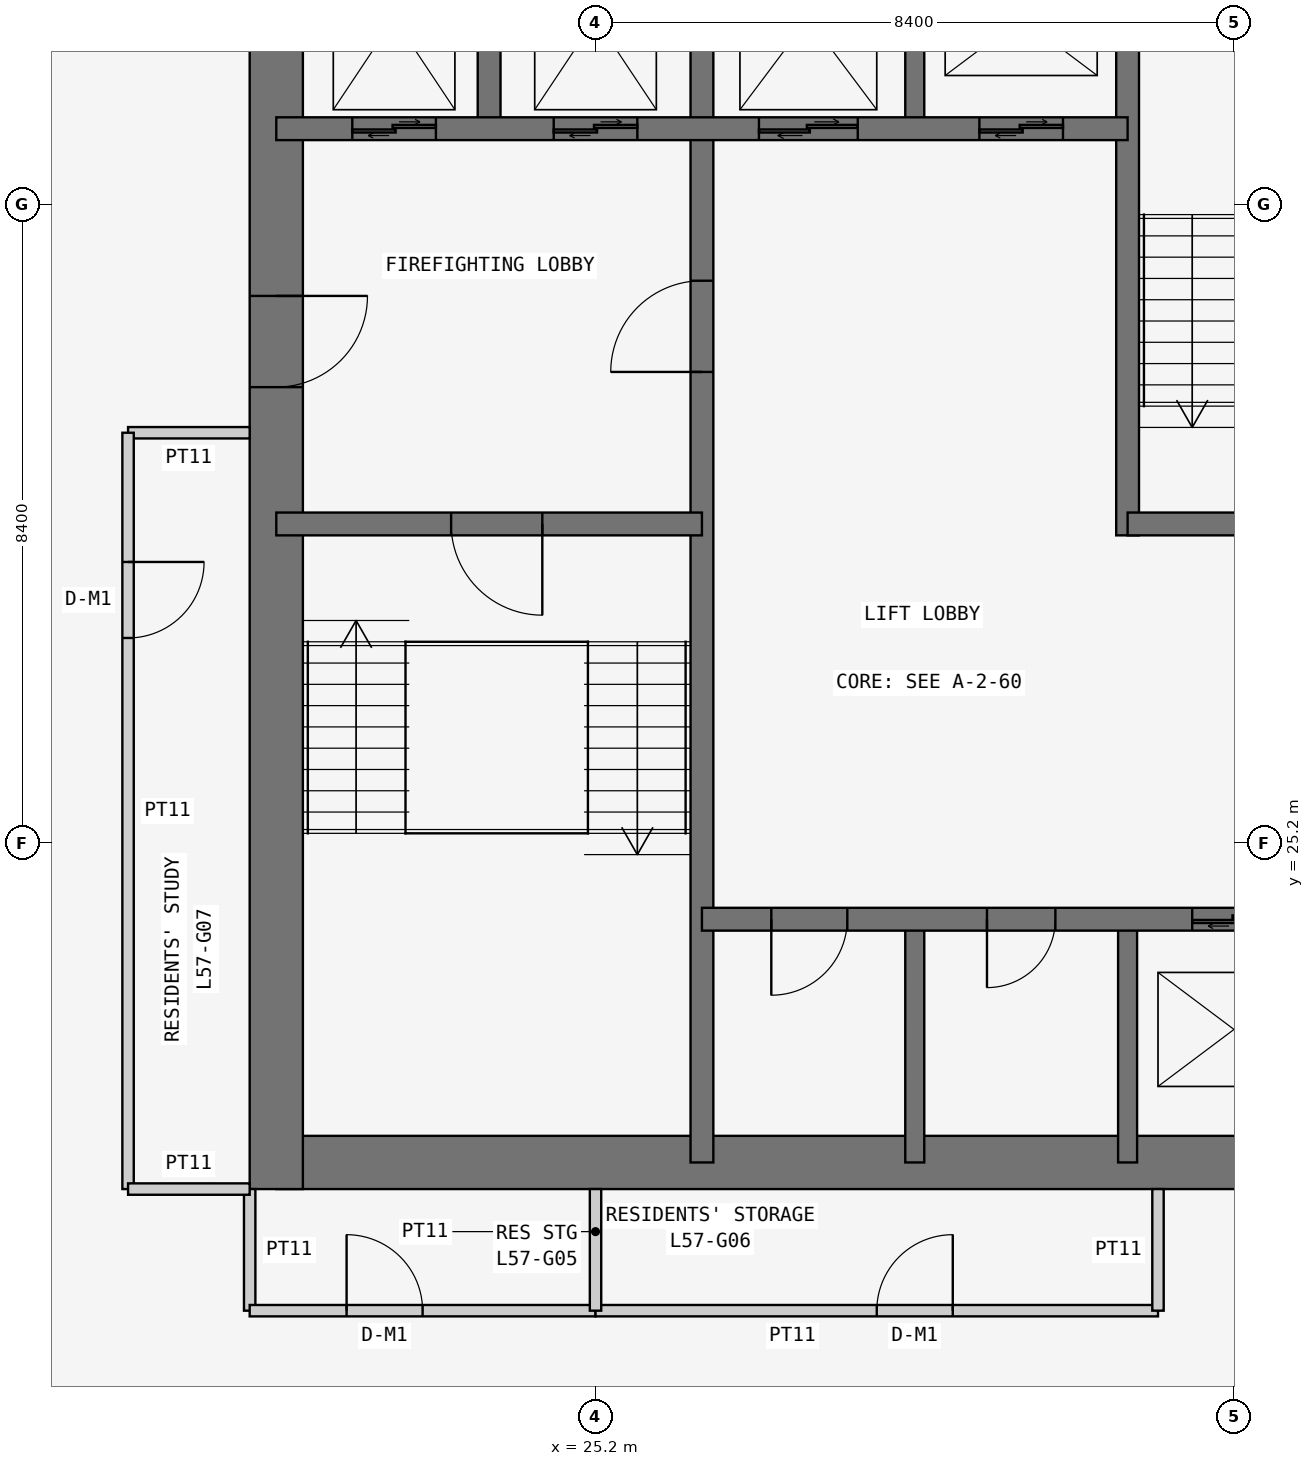
"""IFC4 building model, lengths in metres.
Left out: names, types, materials, properties, quantities, classifications, styles, units other than length and angle.
Written with IfcOpenShell. Run it as: python <this file> out.ifc"""

import sys

from ifc_helpers import new_model, si_unit, direction, frame, frame_2d, origin, place, context, subcontext, project, spatial, rectangle, extrude, element, fill, save


model = new_model("IFC4")
c1 = context("Model", 3, precision=1e-05, world=origin(), true_north=direction((0.0, 1.0)))
c2 = subcontext(c1, "Body", "Model", "MODEL_VIEW")
j1 = project(units=[si_unit("LENGTHUNIT", "METRE"), si_unit("PLANEANGLEUNIT", "RADIAN")], contexts=[c1])
p1 = place(None, origin())
s1 = spatial("IfcSite", under=j1, at=p1, CompositionType="ELEMENT")
p2 = place(p1, origin())
s2 = spatial("IfcBuilding", under=s1, at=p2, CompositionType="ELEMENT")
p3 = place(p2, frame((0.0, 0.0, 219.3)))
s3 = spatial("IfcBuildingStorey", under=s2, at=p3, CompositionType="ELEMENT", Elevation=219.3)
p4 = place(p3, frame((21.0, 21.0, 0.0), z_axis=(0.0, 0.0, 1.0), x_axis=(1.0, 0.0, 0.0)))
e1 = element("IfcWall", 1, at=p4, inside=s3, PredefinedType="SHEAR", context=c2, shape_type="SweptSolid", body=[
    extrude(rectangle(XDim=17.15, YDim=0.7, at=frame_2d((8.575, 0.0))), origin(), (0.0, 0.0, 1.0), 3.6),
])
p5 = place(p3, frame((21.0, 37.8, 0.0), z_axis=(0.0, 0.0, 1.0), x_axis=(0.0, -1.0, 0.0)))
e2 = element("IfcWall", 2, at=p5, inside=s3, PredefinedType="SHEAR", context=c2, shape_type="SweptSolid", body=[
    extrude(rectangle(XDim=17.15, YDim=0.7, at=frame_2d((8.575, 0.0))), origin(), (0.0, 0.0, 1.0), 3.6),
])
p6 = place(p5, frame((5.4, 0.0, 0.0)))
e3 = element("IfcOpeningElement", 3, at=p6, cuts=e2, PredefinedType="OPENING", context=c2, shape_type="SweptSolid", body=[
    extrude(rectangle(XDim=1.2, YDim=2.1, at=frame_2d((0.6, 1.05))), frame((0.0, 0.36, 0.0), z_axis=(0.0, -1.0, 0.0), x_axis=(1.0, 0.0, 0.0)), (0.0, 0.0, 1.0), 0.72),
])
p7 = place(p3, frame((26.6, 21.0, 0.0), z_axis=(0.0, 0.0, 1.0), x_axis=(0.0, 1.0, 0.0)))
e4 = element("IfcWall", 4, at=p7, inside=s3, PredefinedType="SHEAR", context=c2, shape_type="SweptSolid", body=[
    extrude(rectangle(XDim=16.8, YDim=0.3, at=frame_2d((8.4, 0.0))), origin(), (0.0, 0.0, 1.0), 3.6),
])
p8 = place(p7, frame((10.4, 0.0, 0.0)))
e5 = element("IfcOpeningElement", 5, at=p8, cuts=e4, PredefinedType="OPENING", context=c2, shape_type="SweptSolid", body=[
    extrude(rectangle(XDim=1.2, YDim=2.1, at=frame_2d((0.6, 1.05))), frame((0.0, 0.16, 0.0), z_axis=(0.0, -1.0, 0.0), x_axis=(1.0, 0.0, 0.0)), (0.0, 0.0, 1.0), 0.32),
])
p9 = place(p3, frame((21.0, 29.4, 0.0), z_axis=(0.0, 0.0, 1.0), x_axis=(1.0, 0.0, 0.0)))
e6 = element("IfcWall", 6, at=p9, inside=s3, PredefinedType="SHEAR", context=c2, shape_type="SweptSolid", body=[
    extrude(rectangle(XDim=5.6, YDim=0.3, at=frame_2d((2.8, 0.0))), origin(), (0.0, 0.0, 1.0), 3.6),
])
p10 = place(p9, frame((2.3, 0.0, 0.0)))
e7 = element("IfcOpeningElement", 7, at=p10, cuts=e6, PredefinedType="OPENING", context=c2, shape_type="SweptSolid", body=[
    extrude(rectangle(XDim=1.2, YDim=2.1, at=frame_2d((0.6, 1.05))), frame((0.0, 0.16, 0.0), z_axis=(0.0, -1.0, 0.0), x_axis=(1.0, 0.0, 0.0)), (0.0, 0.0, 1.0), 0.32),
])
p11 = place(p3, frame((21.0, 34.6, 0.0), z_axis=(0.0, 0.0, 1.0), x_axis=(1.0, 0.0, 0.0)))
e8 = element("IfcWall", 8, at=p11, inside=s3, PredefinedType="SHEAR", context=c2, shape_type="SweptSolid", body=[
    extrude(rectangle(XDim=11.2, YDim=0.3, at=frame_2d((5.6, 0.0))), origin(), (0.0, 0.0, 1.0), 3.6),
])
p12 = place(p11, frame((9.25, 0.0, 0.0)))
e9 = element("IfcOpeningElement", 9, at=p12, cuts=e8, PredefinedType="OPENING", context=c2, shape_type="SweptSolid", body=[
    extrude(rectangle(XDim=1.1, YDim=2.1, at=frame_2d((0.55, 1.05))), frame((0.0, 0.16, 0.0), z_axis=(0.0, -1.0, 0.0), x_axis=(1.0, 0.0, 0.0)), (0.0, 0.0, 1.0), 0.32),
])
p13 = place(p11, frame((1.0, 0.0, 0.0)))
e10 = element("IfcOpeningElement", 10, at=p13, cuts=e8, PredefinedType="OPENING", context=c2, shape_type="SweptSolid", body=[
    extrude(rectangle(XDim=1.1, YDim=2.1, at=frame_2d((0.55, 1.05))), frame((0.0, 0.16, 0.0), z_axis=(0.0, -1.0, 0.0), x_axis=(1.0, 0.0, 0.0)), (0.0, 0.0, 1.0), 0.32),
])
p14 = place(p11, frame((3.65, 0.0, 0.0)))
e11 = element("IfcOpeningElement", 11, at=p14, cuts=e8, PredefinedType="OPENING", context=c2, shape_type="SweptSolid", body=[
    extrude(rectangle(XDim=1.1, YDim=2.1, at=frame_2d((0.55, 1.05))), frame((0.0, 0.16, 0.0), z_axis=(0.0, -1.0, 0.0), x_axis=(1.0, 0.0, 0.0)), (0.0, 0.0, 1.0), 0.32),
])
p15 = place(p11, frame((6.35, 0.0, 0.0)))
e12 = element("IfcOpeningElement", 12, at=p15, cuts=e8, PredefinedType="OPENING", context=c2, shape_type="SweptSolid", body=[
    extrude(rectangle(XDim=1.3, YDim=2.1, at=frame_2d((0.65, 1.05))), frame((0.0, 0.16, 0.0), z_axis=(0.0, -1.0, 0.0), x_axis=(1.0, 0.0, 0.0)), (0.0, 0.0, 1.0), 0.32),
])
p16 = place(p3, frame((23.8, 34.6, 0.0), z_axis=(0.0, 0.0, 1.0), x_axis=(0.0, 1.0, 0.0)))
e13 = element("IfcWall", 13, at=p16, inside=s3, PredefinedType="SHEAR", context=c2, shape_type="SweptSolid", body=[
    extrude(rectangle(XDim=3.2, YDim=0.3, at=frame_2d((1.6, 0.0))), origin(), (0.0, 0.0, 1.0), 3.6),
])
p17 = place(p3, frame((26.6, 24.2, 0.0), z_axis=(0.0, 0.0, 1.0), x_axis=(1.0, 0.0, 0.0)))
e14 = element("IfcWall", 14, at=p17, inside=s3, PredefinedType="SHEAR", context=c2, shape_type="SweptSolid", body=[
    extrude(rectangle(XDim=11.2, YDim=0.3, at=frame_2d((5.6, 0.0))), origin(), (0.0, 0.0, 1.0), 3.6),
])
p18 = place(p17, frame((0.913, 0.0, 0.0)))
e15 = element("IfcOpeningElement", 15, at=p18, cuts=e14, PredefinedType="OPENING", context=c2, shape_type="SweptSolid", body=[
    extrude(rectangle(XDim=1.0, YDim=2.1, at=frame_2d((0.5, 1.05))), frame((0.0, 0.16, 0.0), z_axis=(0.0, -1.0, 0.0), x_axis=(1.0, 0.0, 0.0)), (0.0, 0.0, 1.0), 0.32),
])
p19 = place(p17, frame((3.75, 0.0, 0.0)))
e16 = element("IfcOpeningElement", 16, at=p19, cuts=e14, PredefinedType="OPENING", context=c2, shape_type="SweptSolid", body=[
    extrude(rectangle(XDim=0.9, YDim=2.1, at=frame_2d((0.45, 1.05))), frame((0.0, 0.16, 0.0), z_axis=(0.0, -1.0, 0.0), x_axis=(1.0, 0.0, 0.0)), (0.0, 0.0, 1.0), 0.32),
])
p20 = place(p17, frame((6.45, 0.0, 0.0)))
e17 = element("IfcOpeningElement", 17, at=p20, cuts=e14, PredefinedType="OPENING", context=c2, shape_type="SweptSolid", body=[
    extrude(rectangle(XDim=1.1, YDim=2.1, at=frame_2d((0.55, 1.05))), frame((0.0, 0.16, 0.0), z_axis=(0.0, -1.0, 0.0), x_axis=(1.0, 0.0, 0.0)), (0.0, 0.0, 1.0), 0.32),
])
p21 = place(p17, frame((9.1, 0.0, 0.0)))
e18 = element("IfcOpeningElement", 18, at=p21, cuts=e14, PredefinedType="OPENING", context=c2, shape_type="SweptSolid", body=[
    extrude(rectangle(XDim=1.1, YDim=2.1, at=frame_2d((0.55, 1.05))), frame((0.0, 0.16, 0.0), z_axis=(0.0, -1.0, 0.0), x_axis=(1.0, 0.0, 0.0)), (0.0, 0.0, 1.0), 0.32),
])
p22 = place(p3, frame((32.2, 29.25, 0.0), z_axis=(0.0, 0.0, 1.0), x_axis=(0.0, 1.0, 0.0)))
e19 = element("IfcWall", 19, at=p22, inside=s3, PredefinedType="SHEAR", context=c2, shape_type="SweptSolid", body=[
    extrude(rectangle(XDim=8.55, YDim=0.3, at=frame_2d((4.275, 0.0))), origin(), (0.0, 0.0, 1.0), 3.6),
])
p23 = place(p3, frame((32.2, 29.4, 0.0), z_axis=(0.0, 0.0, 1.0), x_axis=(1.0, 0.0, 0.0)))
e20 = element("IfcWall", 20, at=p23, inside=s3, PredefinedType="SHEAR", context=c2, shape_type="SweptSolid", body=[
    extrude(rectangle(XDim=5.6, YDim=0.3, at=frame_2d((2.8, 0.0))), origin(), (0.0, 0.0, 1.0), 3.6),
])
p24 = place(p23, frame((2.0, 0.0, 0.0)))
e21 = element("IfcOpeningElement", 21, at=p24, cuts=e20, PredefinedType="OPENING", context=c2, shape_type="SweptSolid", body=[
    extrude(rectangle(XDim=1.2, YDim=2.1, at=frame_2d((0.6, 1.05))), frame((0.0, 0.16, 0.0), z_axis=(0.0, -1.0, 0.0), x_axis=(1.0, 0.0, 0.0)), (0.0, 0.0, 1.0), 0.32),
])
for number, where, z_axis, x_axis in (
    (22, (29.4, 21.0, 0.0), (0.0, 0.0, 1.0), (0.0, 1.0, 0.0)),
    (23, (32.2, 21.0, 0.0), (0.0, 0.0, 1.0), (0.0, 1.0, 0.0)),
    (24, (29.4, 34.6, 0.0), (0.0, 0.0, 1.0), (0.0, 1.0, 0.0)),
):
    element("IfcWall", number, at=place(p3, frame(where, z_axis=z_axis, x_axis=x_axis)), inside=s3, PredefinedType="SHEAR", context=c2, shape_type="SweptSolid", body=[
        extrude(rectangle(XDim=3.2, YDim=0.25, at=frame_2d((1.6, 0.0))), origin(), (0.0, 0.0, 1.0), 3.6),
    ])
p25 = place(p3, frame((20.65, 20.65, 0.0), z_axis=(0.0, 0.0, 1.0), x_axis=(0.0, -1.0, 0.0)))
e25 = element("IfcWall", 25, at=p25, inside=s3, PredefinedType="PARTITIONING", context=c2, shape_type="SweptSolid", body=[
    extrude(rectangle(XDim=1.6, YDim=0.15, at=frame_2d((0.8, 0.0))), origin(), (0.0, 0.0, 1.0), 3.45),
])
p26 = place(p3, frame((20.65, 19.05, 0.0), z_axis=(0.0, 0.0, 1.0), x_axis=(1.0, 0.0, 0.0)))
e26 = element("IfcWall", 26, at=p26, inside=s3, PredefinedType="PARTITIONING", context=c2, shape_type="SweptSolid", body=[
    extrude(rectangle(XDim=4.55, YDim=0.15, at=frame_2d((2.275, 0.0))), origin(), (0.0, 0.0, 1.0), 3.45),
])
p27 = place(p26, frame((1.275, 0.0, 0.0)))
e27 = element("IfcOpeningElement", 27, at=p27, cuts=e26, PredefinedType="OPENING", context=c2, shape_type="SweptSolid", body=[
    extrude(rectangle(XDim=1.0, YDim=2.1, at=frame_2d((0.5, 1.05))), frame((0.0, 0.085, 0.0), z_axis=(0.0, -1.0, 0.0), x_axis=(1.0, 0.0, 0.0)), (0.0, 0.0, 1.0), 0.17),
])
p28 = place(p3, frame((25.2, 19.05, 0.0), z_axis=(0.0, 0.0, 1.0), x_axis=(1.0, 0.0, 0.0)))
e28 = element("IfcWall", 28, at=p28, inside=s3, PredefinedType="PARTITIONING", context=c2, shape_type="SweptSolid", body=[
    extrude(rectangle(XDim=7.4, YDim=0.15, at=frame_2d((3.7, 0.0))), origin(), (0.0, 0.0, 1.0), 3.45),
])
p29 = place(p28, frame((3.7, 0.0, 0.0)))
e29 = element("IfcOpeningElement", 29, at=p29, cuts=e28, PredefinedType="OPENING", context=c2, shape_type="SweptSolid", body=[
    extrude(rectangle(XDim=1.0, YDim=2.1, at=frame_2d((0.5, 1.05))), frame((0.0, 0.085, 0.0), z_axis=(0.0, -1.0, 0.0), x_axis=(1.0, 0.0, 0.0)), (0.0, 0.0, 1.0), 0.17),
])
for number, where, z_axis, x_axis in (
    (30, (32.6, 19.05, 0.0), (0.0, 0.0, 1.0), (0.0, 1.0, 0.0)),
    (31, (20.65, 30.6, 0.0), (0.0, 0.0, 1.0), (-1.0, 0.0, 0.0)),
):
    element("IfcWall", number, at=place(p3, frame(where, z_axis=z_axis, x_axis=x_axis)), inside=s3, PredefinedType="PARTITIONING", context=c2, shape_type="SweptSolid", body=[
        extrude(rectangle(XDim=1.6, YDim=0.15, at=frame_2d((0.8, 0.0))), origin(), (0.0, 0.0, 1.0), 3.45),
    ])
p30 = place(p3, frame((19.05, 30.6, 0.0), z_axis=(0.0, 0.0, 1.0), x_axis=(0.0, -1.0, 0.0)))
e32 = element("IfcWall", 32, at=p30, inside=s3, PredefinedType="PARTITIONING", context=c2, shape_type="SweptSolid", body=[
    extrude(rectangle(XDim=9.95, YDim=0.15, at=frame_2d((4.975, 0.0))), origin(), (0.0, 0.0, 1.0), 3.45),
])
p31 = place(p30, frame((1.7, 0.0, 0.0)))
e33 = element("IfcOpeningElement", 33, at=p31, cuts=e32, PredefinedType="OPENING", context=c2, shape_type="SweptSolid", body=[
    extrude(rectangle(XDim=1.0, YDim=2.1, at=frame_2d((0.5, 1.05))), frame((0.0, 0.085, 0.0), z_axis=(0.0, -1.0, 0.0), x_axis=(1.0, 0.0, 0.0)), (0.0, 0.0, 1.0), 0.17),
])
p32 = place(p3, frame((19.05, 20.65, 0.0), z_axis=(0.0, 0.0, 1.0), x_axis=(1.0, 0.0, 0.0)))
e34 = element("IfcWall", 34, at=p32, inside=s3, PredefinedType="PARTITIONING", context=c2, shape_type="SweptSolid", body=[
    extrude(rectangle(XDim=1.6, YDim=0.15, at=frame_2d((0.8, 0.0))), origin(), (0.0, 0.0, 1.0), 3.45),
])
p33 = place(p3, frame((25.2, 19.05, 0.0), z_axis=(0.0, 0.0, 1.0), x_axis=(0.0, 1.0, 0.0)))
e35 = element("IfcWall", 35, at=p33, inside=s3, PredefinedType="PARTITIONING", context=c2, shape_type="SweptSolid", body=[
    extrude(rectangle(XDim=1.6, YDim=0.15, at=frame_2d((0.8, 0.0))), origin(), (0.0, 0.0, 1.0), 2.767),
])
p34 = place(p27, origin())
e36 = element("IfcDoor", 36, at=p34, inside=s3, OperationType="SINGLE_SWING_LEFT", PredefinedType="DOOR", context=c2, shape_type="SweptSolid", body=[
    extrude(rectangle(XDim=1.0, YDim=2.1, at=frame_2d((0.5, 1.05))), frame((0.0, 0.025, 0.0), z_axis=(0.0, -1.0, 0.0), x_axis=(1.0, 0.0, 0.0)), (0.0, 0.0, 1.0), 0.05),
])
fill(e27, e36)
p35 = place(p29, origin())
e37 = element("IfcDoor", 37, at=p35, inside=s3, OperationType="SINGLE_SWING_RIGHT", PredefinedType="DOOR", context=c2, shape_type="SweptSolid", body=[
    extrude(rectangle(XDim=1.0, YDim=2.1, at=frame_2d((0.5, 1.05))), frame((0.0, 0.025, 0.0), z_axis=(0.0, -1.0, 0.0), x_axis=(1.0, 0.0, 0.0)), (0.0, 0.0, 1.0), 0.05),
])
fill(e29, e37)
p36 = place(p31, origin())
e38 = element("IfcDoor", 38, at=p36, inside=s3, OperationType="SINGLE_SWING_LEFT", PredefinedType="DOOR", context=c2, shape_type="SweptSolid", body=[
    extrude(rectangle(XDim=1.0, YDim=2.1, at=frame_2d((0.5, 1.05))), frame((0.0, 0.025, 0.0), z_axis=(0.0, -1.0, 0.0), x_axis=(1.0, 0.0, 0.0)), (0.0, 0.0, 1.0), 0.05),
])
fill(e33, e38)
p37 = place(p6, origin())
e39 = element("IfcDoor", 39, at=p37, inside=s3, OperationType="SINGLE_SWING_LEFT", PredefinedType="DOOR", context=c2, shape_type="SweptSolid", body=[
    extrude(rectangle(XDim=1.2, YDim=2.1, at=frame_2d((0.6, 1.05))), frame((0.0, 0.025, 0.0), z_axis=(0.0, -1.0, 0.0), x_axis=(1.0, 0.0, 0.0)), (0.0, 0.0, 1.0), 0.05),
])
fill(e3, e39)
p38 = place(p10, frame((1.2, 0.0, 0.0), z_axis=(0.0, 0.0, 1.0), x_axis=(-1.0, 0.0, 0.0)))
e40 = element("IfcDoor", 40, at=p38, inside=s3, OperationType="SINGLE_SWING_LEFT", PredefinedType="DOOR", context=c2, shape_type="SweptSolid", body=[
    extrude(rectangle(XDim=1.2, YDim=2.1, at=frame_2d((0.6, 1.05))), frame((0.0, 0.025, 0.0), z_axis=(0.0, -1.0, 0.0), x_axis=(1.0, 0.0, 0.0)), (0.0, 0.0, 1.0), 0.05),
])
fill(e7, e40)
p39 = place(p8, origin())
e41 = element("IfcDoor", 41, at=p39, inside=s3, OperationType="SINGLE_SWING_LEFT", PredefinedType="DOOR", context=c2, shape_type="SweptSolid", body=[
    extrude(rectangle(XDim=1.2, YDim=2.1, at=frame_2d((0.6, 1.05))), frame((0.0, 0.025, 0.0), z_axis=(0.0, -1.0, 0.0), x_axis=(1.0, 0.0, 0.0)), (0.0, 0.0, 1.0), 0.05),
])
fill(e5, e41)
p40 = place(p18, frame((1.0, 0.0, 0.0), z_axis=(0.0, 0.0, 1.0), x_axis=(-1.0, 0.0, 0.0)))
e42 = element("IfcDoor", 42, at=p40, inside=s3, OperationType="SINGLE_SWING_RIGHT", PredefinedType="DOOR", context=c2, shape_type="SweptSolid", body=[
    extrude(rectangle(XDim=1.0, YDim=2.1, at=frame_2d((0.5, 1.05))), frame((0.0, 0.025, 0.0), z_axis=(0.0, -1.0, 0.0), x_axis=(1.0, 0.0, 0.0)), (0.0, 0.0, 1.0), 0.05),
])
fill(e15, e42)
p41 = place(p19, frame((0.9, 0.0, 0.0), z_axis=(0.0, 0.0, 1.0), x_axis=(-1.0, 0.0, 0.0)))
e43 = element("IfcDoor", 43, at=p41, inside=s3, OperationType="SINGLE_SWING_RIGHT", PredefinedType="DOOR", context=c2, shape_type="SweptSolid", body=[
    extrude(rectangle(XDim=0.9, YDim=2.1, at=frame_2d((0.45, 1.05))), frame((0.0, 0.025, 0.0), z_axis=(0.0, -1.0, 0.0), x_axis=(1.0, 0.0, 0.0)), (0.0, 0.0, 1.0), 0.05),
])
fill(e16, e43)
p42 = place(p20, origin())
e44 = element("IfcDoor", 44, at=p42, inside=s3, OperationType="DOUBLE_DOOR_SLIDING", PredefinedType="DOOR", context=c2, shape_type="SweptSolid", body=[
    extrude(rectangle(XDim=1.1, YDim=2.1, at=frame_2d((0.55, 1.05))), frame((0.0, 0.025, 0.0), z_axis=(0.0, -1.0, 0.0), x_axis=(1.0, 0.0, 0.0)), (0.0, 0.0, 1.0), 0.05),
])
fill(e17, e44)
p43 = place(p12, origin())
e45 = element("IfcDoor", 45, at=p43, inside=s3, OperationType="DOUBLE_DOOR_SLIDING", PredefinedType="DOOR", context=c2, shape_type="SweptSolid", body=[
    extrude(rectangle(XDim=1.1, YDim=2.1, at=frame_2d((0.55, 1.05))), frame((0.0, 0.025, 0.0), z_axis=(0.0, -1.0, 0.0), x_axis=(1.0, 0.0, 0.0)), (0.0, 0.0, 1.0), 0.05),
])
fill(e9, e45)
p44 = place(p13, origin())
e46 = element("IfcDoor", 46, at=p44, inside=s3, OperationType="DOUBLE_DOOR_SLIDING", PredefinedType="DOOR", context=c2, shape_type="SweptSolid", body=[
    extrude(rectangle(XDim=1.1, YDim=2.1, at=frame_2d((0.55, 1.05))), frame((0.0, 0.025, 0.0), z_axis=(0.0, -1.0, 0.0), x_axis=(1.0, 0.0, 0.0)), (0.0, 0.0, 1.0), 0.05),
])
fill(e10, e46)
p45 = place(p14, origin())
e47 = element("IfcDoor", 47, at=p45, inside=s3, OperationType="DOUBLE_DOOR_SLIDING", PredefinedType="DOOR", context=c2, shape_type="SweptSolid", body=[
    extrude(rectangle(XDim=1.1, YDim=2.1, at=frame_2d((0.55, 1.05))), frame((0.0, 0.025, 0.0), z_axis=(0.0, -1.0, 0.0), x_axis=(1.0, 0.0, 0.0)), (0.0, 0.0, 1.0), 0.05),
])
fill(e11, e47)
p46 = place(p15, origin())
e48 = element("IfcDoor", 48, at=p46, inside=s3, OperationType="DOUBLE_DOOR_SLIDING", PredefinedType="DOOR", context=c2, shape_type="SweptSolid", body=[
    extrude(rectangle(XDim=1.3, YDim=2.1, at=frame_2d((0.65, 1.05))), frame((0.0, 0.025, 0.0), z_axis=(0.0, -1.0, 0.0), x_axis=(1.0, 0.0, 0.0)), (0.0, 0.0, 1.0), 0.05),
])
fill(e12, e48)
save(model, sys.argv[1])
